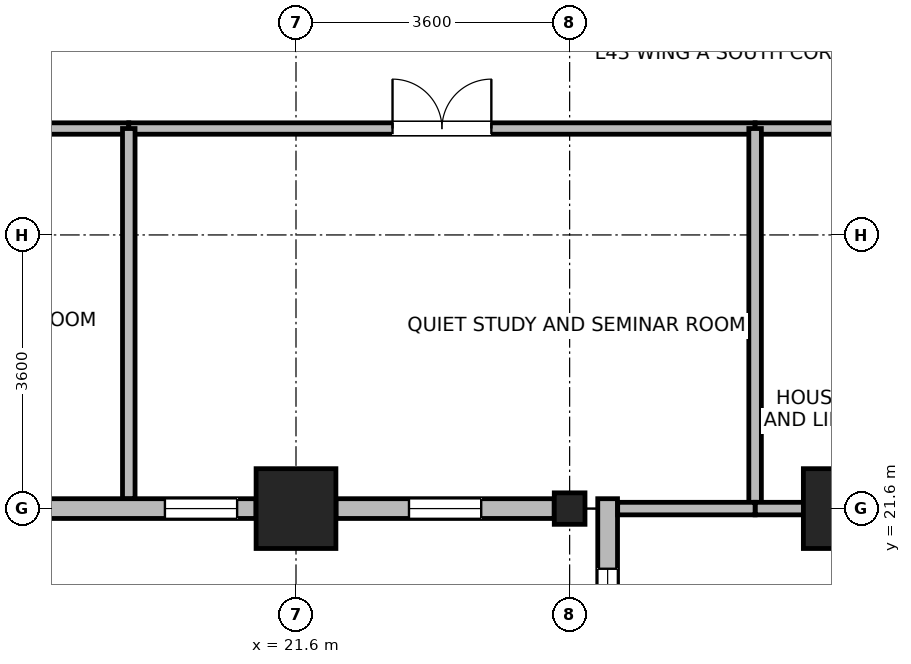
"""IFC4 building model, lengths in metres.
Left out: names, types, materials, properties, quantities, classifications, styles, units other than length and angle.
Written with IfcOpenShell. Run it as: python <this file> out.ifc"""

import sys

from ifc_helpers import new_model, si_unit, direction, frame, frame_2d, origin, origin_2d, place, context, subcontext, project, spatial, rectangle, i_section, extrude, source, transform, mapped, element, fill, save


model = new_model("IFC4")
c1 = context("Model", 3, precision=1e-05, world=origin(), true_north=direction((0.0, 1.0)))
c2 = subcontext(c1, "Body", "Model", "MODEL_VIEW")
j1 = project(units=[si_unit("LENGTHUNIT", "METRE"), si_unit("PLANEANGLEUNIT", "RADIAN")], contexts=[c1])
p1 = place(None, origin())
s1 = spatial("IfcSite", under=j1, at=p1, CompositionType="ELEMENT")
p2 = place(p1, origin())
s2 = spatial("IfcBuilding", under=s1, at=p2, CompositionType="ELEMENT")
p3 = place(p2, frame((0.0, 0.0, 169.8)))
s3 = spatial("IfcBuildingStorey", under=s2, at=p3, CompositionType="ELEMENT", Elevation=169.8)
m1 = source(origin(), c2, "Body", "SweptSolid", [
    extrude(rectangle(XDim=1.05, YDim=1.05, at=origin_2d()), origin(), (0.0, 0.0, 1.0), 3.7),
])
for number, where, z_axis, x_axis in (
    (1, (21.6, 21.6, 0.0), (0.0, 0.0, 1.0), (1.0, 0.0, 0.0)),
    (2, (28.8, 21.6, 0.0), (0.0, 0.0, 1.0), (1.0, 0.0, 0.0)),
):
    element("IfcColumn", number, at=place(p3, frame(where, z_axis=z_axis, x_axis=x_axis)), inside=s3, PredefinedType="COLUMN", context=c2, shape_type="MappedRepresentation", body=[
        mapped(m1, transform((0.0, 0.0, 0.0), x_axis=(1.0, 0.0, 0.0), y_axis=(0.0, 1.0, 0.0), z_axis=(0.0, 0.0, 1.0), scale=1.0)),
    ])
m2 = source(origin(), c2, "Body", "SweptSolid", [
    extrude(i_section(OverallWidth=0.404, OverallDepth=0.414, WebThickness=0.021, FlangeThickness=0.028, FilletRadius=0.015, at=origin_2d()), origin(), (0.0, 0.0, 1.0), 3.7),
])
p4 = place(p3, frame((25.2, 21.6, 0.0), z_axis=(0.0, 0.0, 1.0), x_axis=(1.0, 0.0, 0.0)))
e3 = element("IfcColumn", 3, at=p4, inside=s3, PredefinedType="COLUMN", context=c2, shape_type="MappedRepresentation", body=[
    mapped(m2, transform((0.0, 0.0, 0.0), x_axis=(1.0, 0.0, 0.0), y_axis=(0.0, 1.0, 0.0), z_axis=(0.0, 0.0, 1.0), scale=1.0)),
])
p5 = place(p3, frame((21.074, 21.6, 0.0), z_axis=(0.0, 0.0, 1.0), x_axis=(-1.0, 0.0, 0.0)))
e4 = element("IfcWall", 4, at=p5, inside=s3, PredefinedType="STANDARD", context=c2, shape_type="SweptSolid", body=[
    extrude(rectangle(XDim=2.871, YDim=0.26, at=frame_2d((1.436, 0.0))), origin(), (0.0, 0.0, 1.0), 2.99),
])
p6 = place(p5, frame((0.249, 0.0, 0.85)))
e5 = element("IfcOpeningElement", 5, at=p6, cuts=e4, PredefinedType="OPENING", context=c2, shape_type="SweptSolid", body=[
    extrude(rectangle(XDim=0.95, YDim=1.75, at=frame_2d((0.475, 0.875))), frame((0.0, 0.14, 0.0), z_axis=(0.0, -1.0, 0.0), x_axis=(1.0, 0.0, 0.0)), (0.0, 0.0, 1.0), 0.28),
])
p7 = place(p3, frame((24.997, 21.6, 0.0), z_axis=(0.0, 0.0, 1.0), x_axis=(-1.0, 0.0, 0.0)))
e6 = element("IfcWall", 6, at=p7, inside=s3, PredefinedType="STANDARD", context=c2, shape_type="SweptSolid", body=[
    extrude(rectangle(XDim=2.871, YDim=0.26, at=frame_2d((1.436, 0.0))), origin(), (0.0, 0.0, 1.0), 2.99),
])
p8 = place(p7, frame((0.96, 0.0, 0.85)))
e7 = element("IfcOpeningElement", 7, at=p8, cuts=e6, PredefinedType="OPENING", context=c2, shape_type="SweptSolid", body=[
    extrude(rectangle(XDim=0.95, YDim=1.75, at=frame_2d((0.475, 0.875))), frame((0.0, 0.14, 0.0), z_axis=(0.0, -1.0, 0.0), x_axis=(1.0, 0.0, 0.0)), (0.0, 0.0, 1.0), 0.28),
])
p9 = place(p3, frame((25.7, 1.67, 0.0), z_axis=(0.0, 0.0, 1.0), x_axis=(0.0, 1.0, 0.0)))
e8 = element("IfcWall", 8, at=p9, inside=s3, PredefinedType="STANDARD", context=c2, shape_type="SweptSolid", body=[
    extrude(rectangle(XDim=20.06, YDim=0.26, at=frame_2d((10.03, 0.0))), origin(), (0.0, 0.0, 1.0), 3.44),
])
p10 = place(p9, frame((0.922, 0.0, 0.85)))
e9 = element("IfcOpeningElement", 9, at=p10, cuts=e8, PredefinedType="OPENING", context=c2, shape_type="SweptSolid", body=[
    extrude(rectangle(XDim=1.5, YDim=1.85, at=frame_2d((0.75, 0.925))), frame((0.0, 0.14, 0.0), z_axis=(0.0, -1.0, 0.0), x_axis=(1.0, 0.0, 0.0)), (0.0, 0.0, 1.0), 0.28),
])
p11 = place(p9, frame((7.608, 0.0, 0.85)))
e10 = element("IfcOpeningElement", 10, at=p11, cuts=e8, PredefinedType="OPENING", context=c2, shape_type="SweptSolid", body=[
    extrude(rectangle(XDim=1.5, YDim=1.85, at=frame_2d((0.75, 0.925))), frame((0.0, 0.14, 0.0), z_axis=(0.0, -1.0, 0.0), x_axis=(1.0, 0.0, 0.0)), (0.0, 0.0, 1.0), 0.28),
])
p12 = place(p9, frame((10.952, 0.0, 0.85)))
e11 = element("IfcOpeningElement", 11, at=p12, cuts=e8, PredefinedType="OPENING", context=c2, shape_type="SweptSolid", body=[
    extrude(rectangle(XDim=1.5, YDim=1.85, at=frame_2d((0.75, 0.925))), frame((0.0, 0.14, 0.0), z_axis=(0.0, -1.0, 0.0), x_axis=(1.0, 0.0, 0.0)), (0.0, 0.0, 1.0), 0.28),
])
p13 = place(p9, frame((14.295, 0.0, 0.85)))
e12 = element("IfcOpeningElement", 12, at=p13, cuts=e8, PredefinedType="OPENING", context=c2, shape_type="SweptSolid", body=[
    extrude(rectangle(XDim=1.5, YDim=1.85, at=frame_2d((0.75, 0.925))), frame((0.0, 0.14, 0.0), z_axis=(0.0, -1.0, 0.0), x_axis=(1.0, 0.0, 0.0)), (0.0, 0.0, 1.0), 0.28),
])
p14 = place(p9, frame((17.638, 0.0, 0.85)))
e13 = element("IfcOpeningElement", 13, at=p14, cuts=e8, PredefinedType="OPENING", context=c2, shape_type="SweptSolid", body=[
    extrude(rectangle(XDim=1.5, YDim=1.85, at=frame_2d((0.75, 0.925))), frame((0.0, 0.14, 0.0), z_axis=(0.0, -1.0, 0.0), x_axis=(1.0, 0.0, 0.0)), (0.0, 0.0, 1.0), 0.28),
])
p15 = place(p3, frame((10.32, 26.6, 0.0), z_axis=(0.0, 0.0, 1.0), x_axis=(1.0, 0.0, 0.0)))
e14 = element("IfcWall", 14, at=p15, inside=s3, PredefinedType="PARTITIONING", context=c2, shape_type="SweptSolid", body=[
    extrude(rectangle(XDim=9.08, YDim=0.15, at=frame_2d((4.54, 0.0))), origin(), (0.0, 0.0, 1.0), 3.44),
])
p16 = place(p15, frame((4.065, 0.0, 0.0)))
e15 = element("IfcOpeningElement", 15, at=p16, cuts=e14, PredefinedType="OPENING", context=c2, shape_type="SweptSolid", body=[
    extrude(rectangle(XDim=0.95, YDim=2.1, at=frame_2d((0.475, 1.05))), frame((0.0, 0.085, 0.0), z_axis=(0.0, -1.0, 0.0), x_axis=(1.0, 0.0, 0.0)), (0.0, 0.0, 1.0), 0.17),
])
p17 = place(p3, frame((19.4, 26.6, 0.0), z_axis=(0.0, 0.0, 1.0), x_axis=(1.0, 0.0, 0.0)))
e16 = element("IfcWall", 16, at=p17, inside=s3, PredefinedType="PARTITIONING", context=c2, shape_type="SweptSolid", body=[
    extrude(rectangle(XDim=8.24, YDim=0.15, at=frame_2d((4.12, 0.0))), origin(), (0.0, 0.0, 1.0), 3.44),
])
p18 = place(p17, frame((3.47, 0.0, 0.0)))
e17 = element("IfcOpeningElement", 17, at=p18, cuts=e16, PredefinedType="OPENING", context=c2, shape_type="SweptSolid", body=[
    extrude(rectangle(XDim=1.3, YDim=2.12, at=frame_2d((0.65, 1.06))), frame((0.0, 0.085, 0.0), z_axis=(0.0, -1.0, 0.0), x_axis=(1.0, 0.0, 0.0)), (0.0, 0.0, 1.0), 0.17),
])
p19 = place(p3, frame((27.64, 26.6, 0.0), z_axis=(0.0, 0.0, 1.0), x_axis=(1.0, 0.0, 0.0)))
e18 = element("IfcWall", 18, at=p19, inside=s3, PredefinedType="PARTITIONING", context=c2, shape_type="SweptSolid", body=[
    extrude(rectangle(XDim=2.92, YDim=0.15, at=frame_2d((1.46, 0.0))), origin(), (0.0, 0.0, 1.0), 3.44),
])
p20 = place(p3, frame((19.4, 21.732, 0.0), z_axis=(0.0, 0.0, 1.0), x_axis=(0.0, 1.0, 0.0)))
e19 = element("IfcWall", 19, at=p20, inside=s3, PredefinedType="PARTITIONING", context=c2, shape_type="SweptSolid", body=[
    extrude(rectangle(XDim=4.868, YDim=0.165, at=frame_2d((2.434, 0.0))), origin(), (0.0, 0.0, 1.0), 3.44),
])
p21 = place(p3, frame((27.64, 21.6, 0.0), z_axis=(0.0, 0.0, 1.0), x_axis=(0.0, 1.0, 0.0)))
e20 = element("IfcWall", 20, at=p21, inside=s3, PredefinedType="PARTITIONING", context=c2, shape_type="SweptSolid", body=[
    extrude(rectangle(XDim=5.0, YDim=0.165, at=frame_2d((2.5, 0.0))), origin(), (0.0, 0.0, 1.0), 3.44),
])
p22 = place(p3, frame((27.64, 21.6, 0.0), z_axis=(0.0, 0.0, 1.0), x_axis=(1.0, 0.0, 0.0)))
e21 = element("IfcWall", 21, at=p22, inside=s3, PredefinedType="PARTITIONING", context=c2, shape_type="SweptSolid", body=[
    extrude(rectangle(XDim=2.92, YDim=0.165, at=frame_2d((1.46, 0.0))), origin(), (0.0, 0.0, 1.0), 2.99),
])
p23 = place(p3, frame((25.832, 21.6, 0.0), z_axis=(0.0, 0.0, 1.0), x_axis=(1.0, 0.0, 0.0)))
e22 = element("IfcWall", 22, at=p23, inside=s3, PredefinedType="PARTITIONING", context=c2, shape_type="SweptSolid", body=[
    extrude(rectangle(XDim=1.808, YDim=0.165, at=frame_2d((0.904, 0.0))), origin(), (0.0, 0.0, 1.0), 2.99),
])
p24 = place(p6, origin())
e23 = element("IfcWindow", 23, at=p24, inside=s3, PartitioningType="SINGLE_PANEL", PredefinedType="WINDOW", context=c2, shape_type="SweptSolid", body=[
    extrude(rectangle(XDim=0.95, YDim=1.75, at=frame_2d((0.475, 0.875))), frame((0.0, 0.03, 0.0), z_axis=(0.0, -1.0, 0.0), x_axis=(1.0, 0.0, 0.0)), (0.0, 0.0, 1.0), 0.06),
])
fill(e5, e23)
p25 = place(p8, origin())
e24 = element("IfcWindow", 24, at=p25, inside=s3, PartitioningType="SINGLE_PANEL", PredefinedType="WINDOW", context=c2, shape_type="SweptSolid", body=[
    extrude(rectangle(XDim=0.95, YDim=1.75, at=frame_2d((0.475, 0.875))), frame((0.0, 0.03, 0.0), z_axis=(0.0, -1.0, 0.0), x_axis=(1.0, 0.0, 0.0)), (0.0, 0.0, 1.0), 0.06),
])
fill(e7, e24)
p26 = place(p14, origin())
e25 = element("IfcWindow", 25, at=p26, inside=s3, PartitioningType="SINGLE_PANEL", PredefinedType="WINDOW", context=c2, shape_type="SweptSolid", body=[
    extrude(rectangle(XDim=1.5, YDim=1.85, at=frame_2d((0.75, 0.925))), frame((0.0, 0.03, 0.0), z_axis=(0.0, -1.0, 0.0), x_axis=(1.0, 0.0, 0.0)), (0.0, 0.0, 1.0), 0.06),
])
fill(e13, e25)
p27 = place(p18, origin())
e26 = element("IfcDoor", 26, at=p27, inside=s3, OperationType="DOUBLE_DOOR_SINGLE_SWING", PredefinedType="DOOR", context=c2, shape_type="SweptSolid", body=[
    extrude(rectangle(XDim=1.3, YDim=2.12, at=frame_2d((0.65, 1.06))), frame((0.0, 0.025, 0.0), z_axis=(0.0, -1.0, 0.0), x_axis=(1.0, 0.0, 0.0)), (0.0, 0.0, 1.0), 0.05),
])
fill(e17, e26)
save(model, sys.argv[1])
